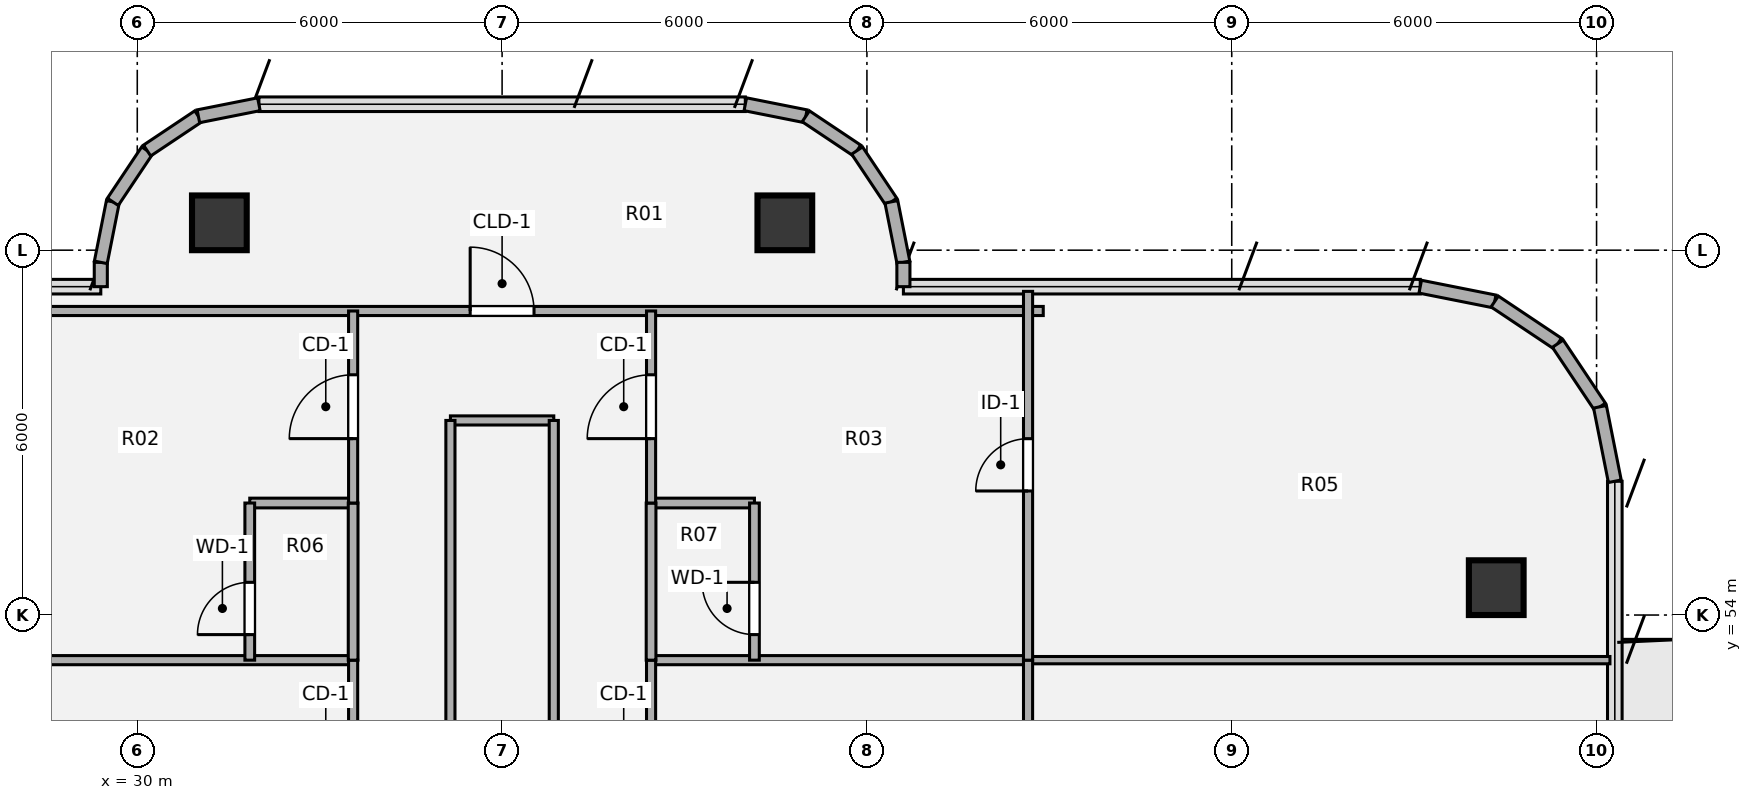
"""IFC4 building model, lengths in metres.
Left out: names, types, materials, properties, quantities, classifications, styles, units other than length and angle.
Written with IfcOpenShell. Run it as: python <this file> out.ifc"""

import sys

from ifc_helpers import new_model, si_unit, direction, frame, frame_2d, origin, origin_2d, place, context, subcontext, project, spatial, rectangle, hollow_circle, extrude, source, transform, mapped, element, fill, save


model = new_model("IFC4")
c1 = context("Model", 3, precision=1e-05, world=origin(), true_north=direction((0.0, 1.0)))
c2 = subcontext(c1, "Body", "Model", "MODEL_VIEW")
j1 = project(units=[si_unit("LENGTHUNIT", "METRE"), si_unit("PLANEANGLEUNIT", "RADIAN")], contexts=[c1])
p1 = place(None, origin())
s1 = spatial("IfcSite", under=j1, at=p1, CompositionType="ELEMENT")
p2 = place(p1, origin())
s2 = spatial("IfcBuilding", under=s1, at=p2, CompositionType="ELEMENT")
p3 = place(p2, frame((0.0, 0.0, 234.36)))
s3 = spatial("IfcBuildingStorey", under=s2, at=p3, CompositionType="ELEMENT", Elevation=234.36)
m1 = source(origin(), c2, "Body", "SweptSolid", [
    extrude(hollow_circle(Radius=0.45, WallThickness=0.032, at=origin_2d()), origin(), (0.0, 0.0, 1.0), 3.78),
])
for number, where, z_axis, x_axis in (
    (1, (52.35, 54.45, 0.0), (0.0, 0.0, 1.0), (1.0, 0.0, 0.0)),
    (2, (31.35, 60.45, 0.0), (0.0, 0.0, 1.0), (1.0, 0.0, 0.0)),
    (3, (40.65, 60.45, 0.0), (0.0, 0.0, 1.0), (1.0, 0.0, 0.0)),
):
    element("IfcColumn", number, at=place(p3, frame(where, z_axis=z_axis, x_axis=x_axis)), inside=s3, PredefinedType="COLUMN", context=c2, shape_type="MappedRepresentation", body=[
        mapped(m1, transform((0.0, 0.0, 0.0), x_axis=(1.0, 0.0, 0.0), y_axis=(0.0, 1.0, 0.0), z_axis=(0.0, 0.0, 1.0), scale=1.0)),
    ])
p4 = place(p3, frame((29.4, 59.4, 0.0), z_axis=(0.0, 0.0, 1.0), x_axis=(0.0, 1.0, 0.0)))
e4 = element("IfcWall", 4, at=p4, inside=s3, PredefinedType="SOLIDWALL", context=c2, shape_type="SweptSolid", body=[
    extrude(rectangle(XDim=0.4, YDim=0.215, at=frame_2d((0.2, 0.0))), origin(), (0.0, 0.0, 1.0), 3.53),
])
p5 = place(p3, frame((29.4, 59.8, 0.0), z_axis=(0.0, 0.0, 1.0), x_axis=(0.195190360752, 0.980765376158, 0.0)))
e5 = element("IfcWall", 5, at=p5, inside=s3, PredefinedType="SOLIDWALL", context=c2, shape_type="SweptSolid", body=[
    extrude(rectangle(XDim=1.014, YDim=0.215, at=frame_2d((0.507, 0.0))), origin(), (0.0, 0.0, 1.0), 3.53),
])
p6 = place(p3, frame((29.598, 60.795, 0.0), z_axis=(0.0, 0.0, 1.0), x_axis=(0.555643898837, 0.831420385657, 0.0)))
e6 = element("IfcWall", 6, at=p6, inside=s3, PredefinedType="SOLIDWALL", context=c2, shape_type="SweptSolid", body=[
    extrude(rectangle(XDim=1.015, YDim=0.215, at=frame_2d((0.507, 0.0))), origin(), (0.0, 0.0, 1.0), 3.53),
])
p7 = place(p3, frame((30.162, 61.638, 0.0), z_axis=(0.0, 0.0, 1.0), x_axis=(0.831346067305, 0.555755086685, 0.0)))
e7 = element("IfcWall", 7, at=p7, inside=s3, PredefinedType="SOLIDWALL", context=c2, shape_type="SweptSolid", body=[
    extrude(rectangle(XDim=1.014, YDim=0.215, at=frame_2d((0.507, 0.0))), origin(), (0.0, 0.0, 1.0), 3.53),
])
for number, where, z_axis, x_axis in (
    (8, (31.005, 62.202, 0.0), (0.0, 0.0, 1.0), (0.981, 0.195, 0.0)),
    (9, (40.0, 62.4, 0.0), (0.0, 0.0, 1.0), (0.981, -0.195, 0.0)),
):
    element("IfcWall", number, at=place(p3, frame(where, z_axis=z_axis, x_axis=x_axis)), inside=s3, PredefinedType="SOLIDWALL", context=c2, shape_type="SweptSolid", body=[
        extrude(rectangle(XDim=1.015, YDim=0.215, at=frame_2d((0.507, 0.0))), origin(), (0.0, 0.0, 1.0), 3.53),
    ])
p8 = place(p3, frame((40.995, 62.202, 0.0), z_axis=(0.0, 0.0, 1.0), x_axis=(0.831346067305, -0.555755086685, 0.0)))
e10 = element("IfcWall", 10, at=p8, inside=s3, PredefinedType="SOLIDWALL", context=c2, shape_type="SweptSolid", body=[
    extrude(rectangle(XDim=1.014, YDim=0.215, at=frame_2d((0.507, 0.0))), origin(), (0.0, 0.0, 1.0), 3.53),
])
p9 = place(p3, frame((41.838, 61.638, 0.0), z_axis=(0.0, 0.0, 1.0), x_axis=(0.555643898837, -0.831420385657, 0.0)))
e11 = element("IfcWall", 11, at=p9, inside=s3, PredefinedType="SOLIDWALL", context=c2, shape_type="SweptSolid", body=[
    extrude(rectangle(XDim=1.015, YDim=0.215, at=frame_2d((0.507, 0.0))), origin(), (0.0, 0.0, 1.0), 3.53),
])
p10 = place(p3, frame((42.402, 60.795, 0.0), z_axis=(0.0, 0.0, 1.0), x_axis=(0.195190360752, -0.980765376158, 0.0)))
e12 = element("IfcWall", 12, at=p10, inside=s3, PredefinedType="SOLIDWALL", context=c2, shape_type="SweptSolid", body=[
    extrude(rectangle(XDim=1.014, YDim=0.215, at=frame_2d((0.507, 0.0))), origin(), (0.0, 0.0, 1.0), 3.53),
])
p11 = place(p3, frame((42.6, 59.8, 0.0), z_axis=(0.0, 0.0, 1.0), x_axis=(0.0, -1.0, 0.0)))
e13 = element("IfcWall", 13, at=p11, inside=s3, PredefinedType="SOLIDWALL", context=c2, shape_type="SweptSolid", body=[
    extrude(rectangle(XDim=0.4, YDim=0.215, at=frame_2d((0.2, 0.0))), origin(), (0.0, 0.0, 1.0), 3.53),
])
for number, where, z_axis, x_axis in (
    (14, (51.1, 59.4, 0.0), (0.0, 0.0, 1.0), (0.981, -0.195, 0.0)),
    (15, (52.325, 59.156, 0.0), (0.0, 0.0, 1.0), (0.831, -0.556, 0.0)),
    (16, (53.363, 58.463, 0.0), (0.0, 0.0, 1.0), (0.556, -0.831, 0.0)),
    (17, (54.056, 57.425, 0.0), (0.0, 0.0, 1.0), (0.195, -0.981, 0.0)),
):
    element("IfcWall", number, at=place(p3, frame(where, z_axis=z_axis, x_axis=x_axis)), inside=s3, PredefinedType="SOLIDWALL", context=c2, shape_type="SweptSolid", body=[
        extrude(rectangle(XDim=1.249, YDim=0.215, at=frame_2d((0.624, 0.0))), origin(), (0.0, 0.0, 1.0), 3.53),
    ])
for number, where, z_axis, x_axis in (
    (18, (27.35, 53.258, 0.0), (0.0, 0.0, 1.0), (1.0, 0.0, 0.0)),
    (19, (38.45, 53.258, 0.0), (0.0, 0.0, 1.0), (1.0, 0.0, 0.0)),
):
    element("IfcWall", number, at=place(p3, frame(where, z_axis=z_axis, x_axis=x_axis)), inside=s3, PredefinedType="PARTITIONING", context=c2, shape_type="SweptSolid", body=[
        extrude(rectangle(XDim=6.2, YDim=0.15, at=frame_2d((3.1, 0.0))), origin(), (0.0, 0.0, 1.0), 3.055),
    ])
p12 = place(p3, frame((44.65, 53.258, 0.0), z_axis=(0.0, 0.0, 1.0), x_axis=(1.0, 0.0, 0.0)))
e20 = element("IfcWall", 20, at=p12, inside=s3, PredefinedType="PARTITIONING", context=c2, shape_type="SweptSolid", body=[
    extrude(rectangle(XDim=9.57, YDim=0.12, at=frame_2d((4.785, 0.0))), origin(), (0.0, 0.0, 1.0), 3.055),
])
for number, where, z_axis, x_axis in (
    (21, (31.85, 55.842, 0.0), (0.0, 0.0, 1.0), (1.0, 0.0, 0.0)),
    (22, (38.45, 55.842, 0.0), (0.0, 0.0, 1.0), (1.0, 0.0, 0.0)),
):
    element("IfcWall", number, at=place(p3, frame(where, z_axis=z_axis, x_axis=x_axis)), inside=s3, PredefinedType="PLUMBINGWALL", context=c2, shape_type="SweptSolid", body=[
        extrude(rectangle(XDim=1.7, YDim=0.16, at=frame_2d((0.85, 0.0))), origin(), (0.0, 0.0, 1.0), 3.259),
    ])
p13 = place(p3, frame((35.15, 57.2, 0.0), z_axis=(0.0, 0.0, 1.0), x_axis=(1.0, 0.0, 0.0)))
e23 = element("IfcWall", 23, at=p13, inside=s3, PredefinedType="PARTITIONING", context=c2, shape_type="SweptSolid", body=[
    extrude(rectangle(XDim=1.7, YDim=0.15, at=frame_2d((0.85, 0.0))), origin(), (0.0, 0.0, 1.0), 3.308),
])
p14 = place(p3, frame((27.1, 59.0, 0.0), z_axis=(0.0, 0.0, 1.0), x_axis=(1.0, 0.0, 0.0)))
e24 = element("IfcWall", 24, at=p14, inside=s3, PredefinedType="PARTITIONING", context=c2, shape_type="SweptSolid", body=[
    extrude(rectangle(XDim=17.8, YDim=0.15, at=frame_2d((8.9, 0.0))), origin(), (0.0, 0.0, 1.0), 3.308),
])
p15 = place(p14, frame((8.375, 0.0, 0.0)))
e25 = element("IfcOpeningElement", 25, at=p15, cuts=e24, PredefinedType="OPENING", context=c2, shape_type="SweptSolid", body=[
    extrude(rectangle(XDim=1.05, YDim=2.1, at=origin_2d()), frame((0.525, 0.085, 1.05), z_axis=(0.0, -1.0, 0.0), x_axis=(1.0, 0.0, 0.0)), (0.0, 0.0, 1.0), 0.17),
])
p16 = place(p3, frame((31.85, 53.258, 0.0), z_axis=(0.0, 0.0, 1.0), x_axis=(0.0, 1.0, 0.0)))
e26 = element("IfcWall", 26, at=p16, inside=s3, PredefinedType="PLUMBINGWALL", context=c2, shape_type="SweptSolid", body=[
    extrude(rectangle(XDim=2.584, YDim=0.16, at=frame_2d((1.292, 0.0))), origin(), (0.0, 0.0, 1.0), 3.5),
])
p17 = place(p16, frame((0.42, 0.0, 0.0)))
e27 = element("IfcOpeningElement", 27, at=p17, cuts=e26, PredefinedType="OPENING", context=c2, shape_type="SweptSolid", body=[
    extrude(rectangle(XDim=0.86, YDim=2.1, at=origin_2d()), frame((0.43, 0.09, 1.05), z_axis=(0.0, -1.0, 0.0), x_axis=(1.0, 0.0, 0.0)), (0.0, 0.0, 1.0), 0.18),
])
p18 = place(p3, frame((33.55, 50.1, 0.0), z_axis=(0.0, 0.0, 1.0), x_axis=(0.0, 1.0, 0.0)))
e28 = element("IfcWall", 28, at=p18, inside=s3, PredefinedType="PARTITIONING", context=c2, shape_type="SweptSolid", body=[
    extrude(rectangle(XDim=3.158, YDim=0.15, at=frame_2d((1.579, 0.0))), origin(), (0.0, 0.0, 1.0), 3.5),
])
p19 = place(p18, frame((1.059, 0.0, 0.0)))
e29 = element("IfcOpeningElement", 29, at=p19, cuts=e28, PredefinedType="OPENING", context=c2, shape_type="SweptSolid", body=[
    extrude(rectangle(XDim=1.05, YDim=2.1, at=origin_2d()), frame((0.525, 0.085, 1.05), z_axis=(0.0, -1.0, 0.0), x_axis=(1.0, 0.0, 0.0)), (0.0, 0.0, 1.0), 0.17),
])
p20 = place(p3, frame((33.55, 53.258, 0.0), z_axis=(0.0, 0.0, 1.0), x_axis=(0.0, 1.0, 0.0)))
e30 = element("IfcWall", 30, at=p20, inside=s3, PredefinedType="PLUMBINGWALL", context=c2, shape_type="SweptSolid", body=[
    extrude(rectangle(XDim=2.584, YDim=0.16, at=frame_2d((1.292, 0.0))), origin(), (0.0, 0.0, 1.0), 3.5),
])
p21 = place(p3, frame((33.55, 55.842, 0.0), z_axis=(0.0, 0.0, 1.0), x_axis=(0.0, 1.0, 0.0)))
e31 = element("IfcWall", 31, at=p21, inside=s3, PredefinedType="PARTITIONING", context=c2, shape_type="SweptSolid", body=[
    extrude(rectangle(XDim=3.158, YDim=0.15, at=frame_2d((1.579, 0.0))), origin(), (0.0, 0.0, 1.0), 3.5),
])
p22 = place(p21, frame((1.059, 0.0, 0.0)))
e32 = element("IfcOpeningElement", 32, at=p22, cuts=e31, PredefinedType="OPENING", context=c2, shape_type="SweptSolid", body=[
    extrude(rectangle(XDim=1.05, YDim=2.1, at=origin_2d()), frame((0.525, 0.085, 1.05), z_axis=(0.0, -1.0, 0.0), x_axis=(1.0, 0.0, 0.0)), (0.0, 0.0, 1.0), 0.17),
])
p23 = place(p3, frame((35.15, 44.62, 0.0), z_axis=(0.0, 0.0, 1.0), x_axis=(0.0, 1.0, 0.0)))
e33 = element("IfcWall", 33, at=p23, inside=s3, PredefinedType="PARTITIONING", context=c2, shape_type="SweptSolid", body=[
    extrude(rectangle(XDim=12.58, YDim=0.15, at=frame_2d((6.29, 0.0))), origin(), (0.0, 0.0, 1.0), 3.5),
])
p24 = place(p23, frame((5.83, 0.0, 0.0)))
e34 = element("IfcOpeningElement", 34, at=p24, cuts=e33, PredefinedType="OPENING", context=c2, shape_type="SweptSolid", body=[
    extrude(rectangle(XDim=0.86, YDim=2.1, at=origin_2d()), frame((0.43, 0.085, 1.05), z_axis=(0.0, -1.0, 0.0), x_axis=(1.0, 0.0, 0.0)), (0.0, 0.0, 1.0), 0.17),
])
p25 = place(p3, frame((36.85, 44.62, 0.0), z_axis=(0.0, 0.0, 1.0), x_axis=(0.0, 1.0, 0.0)))
e35 = element("IfcWall", 35, at=p25, inside=s3, PredefinedType="PARTITIONING", context=c2, shape_type="SweptSolid", body=[
    extrude(rectangle(XDim=12.58, YDim=0.15, at=frame_2d((6.29, 0.0))), origin(), (0.0, 0.0, 1.0), 3.5),
])
p26 = place(p3, frame((38.45, 50.1, 0.0), z_axis=(0.0, 0.0, 1.0), x_axis=(0.0, 1.0, 0.0)))
e36 = element("IfcWall", 36, at=p26, inside=s3, PredefinedType="PARTITIONING", context=c2, shape_type="SweptSolid", body=[
    extrude(rectangle(XDim=3.158, YDim=0.15, at=frame_2d((1.579, 0.0))), origin(), (0.0, 0.0, 1.0), 3.5),
])
p27 = place(p26, frame((1.059, 0.0, 0.0)))
e37 = element("IfcOpeningElement", 37, at=p27, cuts=e36, PredefinedType="OPENING", context=c2, shape_type="SweptSolid", body=[
    extrude(rectangle(XDim=1.05, YDim=2.1, at=origin_2d()), frame((0.525, 0.085, 1.05), z_axis=(0.0, -1.0, 0.0), x_axis=(1.0, 0.0, 0.0)), (0.0, 0.0, 1.0), 0.17),
])
p28 = place(p3, frame((38.45, 53.258, 0.0), z_axis=(0.0, 0.0, 1.0), x_axis=(0.0, 1.0, 0.0)))
e38 = element("IfcWall", 38, at=p28, inside=s3, PredefinedType="PLUMBINGWALL", context=c2, shape_type="SweptSolid", body=[
    extrude(rectangle(XDim=2.584, YDim=0.16, at=frame_2d((1.292, 0.0))), origin(), (0.0, 0.0, 1.0), 3.5),
])
p29 = place(p3, frame((38.45, 55.842, 0.0), z_axis=(0.0, 0.0, 1.0), x_axis=(0.0, 1.0, 0.0)))
e39 = element("IfcWall", 39, at=p29, inside=s3, PredefinedType="PARTITIONING", context=c2, shape_type="SweptSolid", body=[
    extrude(rectangle(XDim=3.158, YDim=0.15, at=frame_2d((1.579, 0.0))), origin(), (0.0, 0.0, 1.0), 3.5),
])
p30 = place(p29, frame((1.059, 0.0, 0.0)))
e40 = element("IfcOpeningElement", 40, at=p30, cuts=e39, PredefinedType="OPENING", context=c2, shape_type="SweptSolid", body=[
    extrude(rectangle(XDim=1.05, YDim=2.1, at=origin_2d()), frame((0.525, 0.085, 1.05), z_axis=(0.0, -1.0, 0.0), x_axis=(1.0, 0.0, 0.0)), (0.0, 0.0, 1.0), 0.17),
])
p31 = place(p3, frame((40.15, 53.258, 0.0), z_axis=(0.0, 0.0, 1.0), x_axis=(0.0, 1.0, 0.0)))
e41 = element("IfcWall", 41, at=p31, inside=s3, PredefinedType="PLUMBINGWALL", context=c2, shape_type="SweptSolid", body=[
    extrude(rectangle(XDim=2.584, YDim=0.16, at=frame_2d((1.292, 0.0))), origin(), (0.0, 0.0, 1.0), 3.5),
])
p32 = place(p31, frame((0.42, 0.0, 0.0)))
e42 = element("IfcOpeningElement", 42, at=p32, cuts=e41, PredefinedType="OPENING", context=c2, shape_type="SweptSolid", body=[
    extrude(rectangle(XDim=0.86, YDim=2.1, at=origin_2d()), frame((0.43, 0.09, 1.05), z_axis=(0.0, -1.0, 0.0), x_axis=(1.0, 0.0, 0.0)), (0.0, 0.0, 1.0), 0.18),
])
p33 = place(p3, frame((44.65, 47.516, 0.0), z_axis=(0.0, 0.0, 1.0), x_axis=(0.0, 1.0, 0.0)))
e43 = element("IfcWall", 43, at=p33, inside=s3, PredefinedType="PARTITIONING", context=c2, shape_type="SweptSolid", body=[
    extrude(rectangle(XDim=5.742, YDim=0.15, at=frame_2d((2.871, 0.0))), origin(), (0.0, 0.0, 1.0), 3.5),
])
p34 = place(p33, frame((2.524, 0.0, 0.0)))
e44 = element("IfcOpeningElement", 44, at=p34, cuts=e43, PredefinedType="OPENING", context=c2, shape_type="SweptSolid", body=[
    extrude(rectangle(XDim=0.86, YDim=2.1, at=origin_2d()), frame((0.43, 0.085, 1.05), z_axis=(0.0, -1.0, 0.0), x_axis=(1.0, 0.0, 0.0)), (0.0, 0.0, 1.0), 0.17),
])
p35 = place(p3, frame((44.65, 53.258, 0.0), z_axis=(0.0, 0.0, 1.0), x_axis=(0.0, 1.0, 0.0)))
e45 = element("IfcWall", 45, at=p35, inside=s3, PredefinedType="PARTITIONING", context=c2, shape_type="SweptSolid", body=[
    extrude(rectangle(XDim=6.064, YDim=0.15, at=frame_2d((3.032, 0.0))), origin(), (0.0, 0.0, 1.0), 3.5),
])
p36 = place(p35, frame((2.782, 0.0, 0.0)))
e46 = element("IfcOpeningElement", 46, at=p36, cuts=e45, PredefinedType="OPENING", context=c2, shape_type="SweptSolid", body=[
    extrude(rectangle(XDim=0.86, YDim=2.1, at=origin_2d()), frame((0.43, 0.085, 1.05), z_axis=(0.0, -1.0, 0.0), x_axis=(1.0, 0.0, 0.0)), (0.0, 0.0, 1.0), 0.17),
])
m2 = source(origin(), c2, "Body", "SweptSolid", [
    extrude(rectangle(XDim=1.05, YDim=2.1, at=origin_2d()), frame((0.525, 0.025, 1.05), z_axis=(0.0, -1.0, 0.0), x_axis=(1.0, 0.0, 0.0)), (0.0, 0.0, 1.0), 0.05),
])
p37 = place(p15, origin())
e47 = element("IfcDoor", 47, at=p37, inside=s3, OperationType="SINGLE_SWING_LEFT", PredefinedType="DOOR", context=c2, shape_type="MappedRepresentation", body=[
    mapped(m2, transform((0.0, 0.0, 0.0), x_axis=(1.0, 0.0, 0.0), y_axis=(0.0, 1.0, 0.0), z_axis=(0.0, 0.0, 1.0), scale=1.0)),
])
fill(e25, e47)
m3 = source(origin(), c2, "Body", "SweptSolid", [
    extrude(rectangle(XDim=0.86, YDim=2.1, at=origin_2d()), frame((0.43, 0.025, 1.05), z_axis=(0.0, -1.0, 0.0), x_axis=(1.0, 0.0, 0.0)), (0.0, 0.0, 1.0), 0.05),
])
p38 = place(p17, origin())
e48 = element("IfcDoor", 48, at=p38, inside=s3, OperationType="SINGLE_SWING_LEFT", PredefinedType="DOOR", context=c2, shape_type="MappedRepresentation", body=[
    mapped(m3, transform((0.0, 0.0, 0.0), x_axis=(1.0, 0.0, 0.0), y_axis=(0.0, 1.0, 0.0), z_axis=(0.0, 0.0, 1.0), scale=1.0)),
])
fill(e27, e48)
m4 = source(origin(), c2, "Body", "SweptSolid", [
    extrude(rectangle(XDim=1.05, YDim=2.1, at=origin_2d()), frame((0.525, 0.025, 1.05), z_axis=(0.0, -1.0, 0.0), x_axis=(1.0, 0.0, 0.0)), (0.0, 0.0, 1.0), 0.05),
])
p39 = place(p22, origin())
e49 = element("IfcDoor", 49, at=p39, inside=s3, OperationType="SINGLE_SWING_LEFT", PredefinedType="DOOR", context=c2, shape_type="MappedRepresentation", body=[
    mapped(m4, transform((0.0, 0.0, 0.0), x_axis=(1.0, 0.0, 0.0), y_axis=(0.0, 1.0, 0.0), z_axis=(0.0, 0.0, 1.0), scale=1.0)),
])
fill(e32, e49)
p40 = place(p30, origin())
e50 = element("IfcDoor", 50, at=p40, inside=s3, OperationType="SINGLE_SWING_LEFT", PredefinedType="DOOR", context=c2, shape_type="MappedRepresentation", body=[
    mapped(m4, transform((0.0, 0.0, 0.0), x_axis=(1.0, 0.0, 0.0), y_axis=(0.0, 1.0, 0.0), z_axis=(0.0, 0.0, 1.0), scale=1.0)),
])
fill(e40, e50)
p41 = place(p32, origin())
e51 = element("IfcDoor", 51, at=p41, inside=s3, OperationType="SINGLE_SWING_RIGHT", PredefinedType="DOOR", context=c2, shape_type="MappedRepresentation", body=[
    mapped(m3, transform((0.0, 0.0, 0.0), x_axis=(1.0, 0.0, 0.0), y_axis=(0.0, 1.0, 0.0), z_axis=(0.0, 0.0, 1.0), scale=1.0)),
])
fill(e42, e51)
m5 = source(origin(), c2, "Body", "SweptSolid", [
    extrude(rectangle(XDim=0.86, YDim=2.1, at=origin_2d()), frame((0.43, 0.025, 1.05), z_axis=(0.0, -1.0, 0.0), x_axis=(1.0, 0.0, 0.0)), (0.0, 0.0, 1.0), 0.05),
])
p42 = place(p36, origin())
e52 = element("IfcDoor", 52, at=p42, inside=s3, OperationType="SINGLE_SWING_LEFT", PredefinedType="DOOR", context=c2, shape_type="MappedRepresentation", body=[
    mapped(m5, transform((0.0, 0.0, 0.0), x_axis=(1.0, 0.0, 0.0), y_axis=(0.0, 1.0, 0.0), z_axis=(0.0, 0.0, 1.0), scale=1.0)),
])
fill(e46, e52)
save(model, sys.argv[1])
